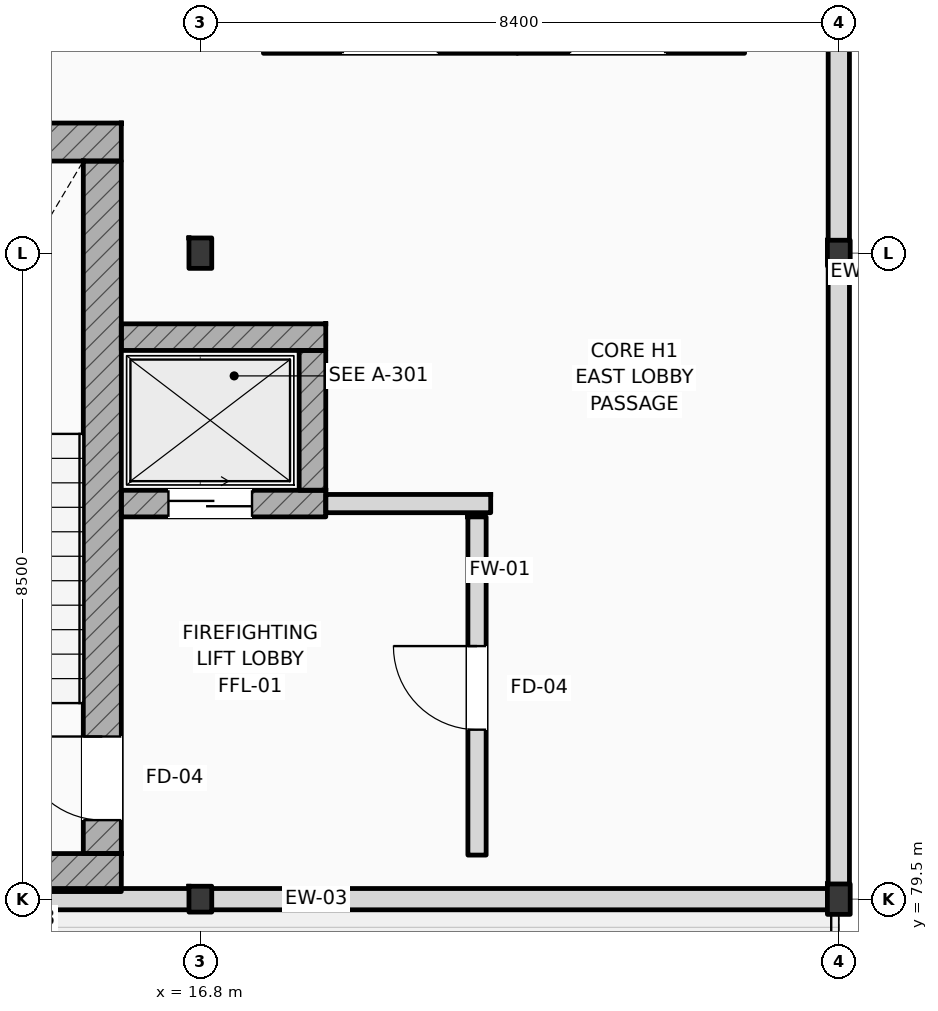
"""IFC4 building model, lengths in metres.
Left out: names, types, materials, properties, quantities, classifications, styles, units other than length and angle.
Written with IfcOpenShell. Run it as: python <this file> out.ifc"""

import sys

from ifc_helpers import new_model, si_unit, direction, frame, frame_2d, origin, origin_2d, place, context, subcontext, project, spatial, rectangle, i_section, extrude, element, fill, save


model = new_model("IFC4")
c1 = context("Model", 3, precision=1e-05, world=origin(), true_north=direction((0.0, 1.0)))
c2 = subcontext(c1, "Body", "Model", "MODEL_VIEW")
j1 = project(units=[si_unit("LENGTHUNIT", "METRE"), si_unit("PLANEANGLEUNIT", "RADIAN")], contexts=[c1])
p1 = place(None, origin())
s1 = spatial("IfcSite", under=j1, at=p1, CompositionType="ELEMENT")
p2 = place(p1, origin())
s2 = spatial("IfcBuilding", under=s1, at=p2, CompositionType="ELEMENT")
p3 = place(p2, frame((0.0, 0.0, 42.6)))
s3 = spatial("IfcBuildingStorey", under=s2, at=p3, CompositionType="ELEMENT", Elevation=42.6)
p4 = place(p3, frame((16.8, 79.5, 0.0), z_axis=(0.0, 0.0, 1.0), x_axis=(1.0, 0.0, 0.0)))
e1 = element("IfcColumn", 1, at=p4, inside=s3, PredefinedType="COLUMN", context=c2, shape_type="SweptSolid", body=[
    extrude(i_section(OverallWidth=0.3, OverallDepth=0.34, WebThickness=0.012, FlangeThickness=0.021, FilletRadius=0.027, at=origin_2d()), origin(), (0.0, 0.0, 1.0), 4.2),
])
for number, where, z_axis, x_axis in (
    (2, (16.8, 88.0, 0.0), (0.0, 0.0, 1.0), (1.0, 0.0, 0.0)),
    (3, (25.2, 79.5, 0.0), (0.0, 0.0, 1.0), (1.0, 0.0, 0.0)),
):
    element("IfcColumn", number, at=place(p3, frame(where, z_axis=z_axis, x_axis=x_axis)), inside=s3, PredefinedType="COLUMN", context=c2, shape_type="SweptSolid", body=[
        extrude(i_section(OverallWidth=0.3, OverallDepth=0.4, WebThickness=0.013, FlangeThickness=0.024, FilletRadius=0.027, at=origin_2d()), origin(), (0.0, 0.0, 1.0), 4.2),
    ])
p5 = place(p3, frame((25.2, 88.0, 0.0), z_axis=(0.0, 0.0, 1.0), x_axis=(1.0, 0.0, 0.0)))
e4 = element("IfcColumn", 4, at=p5, inside=s3, PredefinedType="COLUMN", context=c2, shape_type="SweptSolid", body=[
    extrude(i_section(OverallWidth=0.3, OverallDepth=0.34, WebThickness=0.012, FlangeThickness=0.021, FilletRadius=0.027, at=origin_2d()), origin(), (0.0, 0.0, 1.0), 4.2),
])
for number, where, z_axis, x_axis in (
    (5, (10.6, 89.462, 0.0), (0.0, 0.0, 1.0), (1.0, 0.0, 0.0)),
    (6, (10.6, 79.85, 0.0), (0.0, 0.0, 1.0), (1.0, 0.0, 0.0)),
):
    element("IfcWall", number, at=place(p3, frame(where, z_axis=z_axis, x_axis=x_axis)), inside=s3, PredefinedType="SHEAR", context=c2, shape_type="SweptSolid", body=[
        extrude(rectangle(XDim=5.16, YDim=0.5, at=frame_2d((2.58, 0.0))), origin(), (0.0, 0.0, 1.0), 4.2),
    ])
p6 = place(p3, frame((15.51, 80.1, 0.0), z_axis=(0.0, 0.0, 1.0), x_axis=(0.0, 1.0, 0.0)))
e7 = element("IfcWall", 7, at=p6, inside=s3, PredefinedType="SHEAR", context=c2, shape_type="SweptSolid", body=[
    extrude(rectangle(XDim=9.112, YDim=0.5, at=frame_2d((4.556, 0.0))), origin(), (0.0, 0.0, 1.0), 4.2),
])
p7 = place(p6, frame((0.44, 0.0, 0.0)))
e8 = element("IfcOpeningElement", 8, at=p7, cuts=e7, PredefinedType="OPENING", context=c2, shape_type="SweptSolid", body=[
    extrude(rectangle(XDim=1.1, YDim=2.2, at=frame_2d((0.55, 1.1))), frame((0.0, 0.26, 0.0), z_axis=(0.0, -1.0, 0.0), x_axis=(1.0, 0.0, 0.0)), (0.0, 0.0, 1.0), 0.52),
])
p8 = place(p3, frame((0.0, 79.5, 0.0), z_axis=(0.0, 0.0, 1.0), x_axis=(1.0, 0.0, 0.0)))
e9 = element("IfcWall", 9, at=p8, inside=s3, PredefinedType="STANDARD", context=c2, shape_type="SweptSolid", body=[
    extrude(rectangle(XDim=25.2, YDim=0.28, at=frame_2d((12.6, 0.0))), origin(), (0.0, 0.0, 1.0), 3.38),
])
p9 = place(p8, frame((8.75, 0.0, 0.0)))
e10 = element("IfcOpeningElement", 10, at=p9, cuts=e9, PredefinedType="OPENING", context=c2, shape_type="SweptSolid", body=[
    extrude(rectangle(XDim=1.8, YDim=2.4, at=frame_2d((0.9, 1.2))), frame((0.0, 0.15, 0.0), z_axis=(0.0, -1.0, 0.0), x_axis=(1.0, 0.0, 0.0)), (0.0, 0.0, 1.0), 0.3),
])
p10 = place(p3, frame((25.2, 79.5, 0.0), z_axis=(0.0, 0.0, 1.0), x_axis=(0.0, 1.0, 0.0)))
e11 = element("IfcWall", 11, at=p10, inside=s3, PredefinedType="STANDARD", context=c2, shape_type="SweptSolid", body=[
    extrude(rectangle(XDim=16.5, YDim=0.28, at=frame_2d((8.25, 0.0))), origin(), (0.0, 0.0, 1.0), 3.57),
])
p11 = place(p3, frame((15.76, 86.895, 0.0), z_axis=(0.0, 0.0, 1.0), x_axis=(1.0, 0.0, 0.0)))
e12 = element("IfcWall", 12, at=p11, inside=s3, PredefinedType="SHEAR", context=c2, shape_type="SweptSolid", body=[
    extrude(rectangle(XDim=2.69, YDim=0.35, at=frame_2d((1.345, 0.0))), origin(), (0.0, 0.0, 1.0), 3.94),
])
p12 = place(p3, frame((15.76, 84.705, 0.0), z_axis=(0.0, 0.0, 1.0), x_axis=(1.0, 0.0, 0.0)))
e13 = element("IfcWall", 13, at=p12, inside=s3, PredefinedType="SHEAR", context=c2, shape_type="SweptSolid", body=[
    extrude(rectangle(XDim=2.69, YDim=0.35, at=frame_2d((1.345, 0.0))), origin(), (0.0, 0.0, 1.0), 3.94),
])
p13 = place(p12, frame((0.62, 0.0, 0.0)))
e14 = element("IfcOpeningElement", 14, at=p13, cuts=e13, PredefinedType="OPENING", context=c2, shape_type="SweptSolid", body=[
    extrude(rectangle(XDim=1.1, YDim=2.2, at=frame_2d((0.55, 1.1))), frame((0.0, 0.185, 0.0), z_axis=(0.0, -1.0, 0.0), x_axis=(1.0, 0.0, 0.0)), (0.0, 0.0, 1.0), 0.37),
])
p14 = place(p3, frame((18.275, 84.88, 0.0), z_axis=(0.0, 0.0, 1.0), x_axis=(0.0, 1.0, 0.0)))
e15 = element("IfcWall", 15, at=p14, inside=s3, PredefinedType="SHEAR", context=c2, shape_type="SweptSolid", body=[
    extrude(rectangle(XDim=1.84, YDim=0.35, at=frame_2d((0.92, 0.0))), origin(), (0.0, 0.0, 1.0), 3.94),
])
p15 = place(p3, frame((17.63, 90.805, 0.0), z_axis=(0.0, 0.0, 1.0), x_axis=(1.0, 0.0, 0.0)))
e16 = element("IfcWall", 16, at=p15, inside=s3, PredefinedType="SHEAR", context=c2, shape_type="SweptSolid", body=[
    extrude(rectangle(XDim=3.34, YDim=0.35, at=frame_2d((1.67, 0.0))), origin(), (0.0, 0.0, 1.0), 3.94),
])
p16 = place(p15, frame((1.045, 0.0, 0.0)))
e17 = element("IfcOpeningElement", 17, at=p16, cuts=e16, PredefinedType="OPENING", context=c2, shape_type="SweptSolid", body=[
    extrude(rectangle(XDim=1.25, YDim=2.25, at=frame_2d((0.625, 1.125))), frame((0.0, 0.185, 0.0), z_axis=(0.0, -1.0, 0.0), x_axis=(1.0, 0.0, 0.0)), (0.0, 0.0, 1.0), 0.37),
])
p17 = place(p3, frame((20.97, 90.805, 0.0), z_axis=(0.0, 0.0, 1.0), x_axis=(1.0, 0.0, 0.0)))
e18 = element("IfcWall", 18, at=p17, inside=s3, PredefinedType="SHEAR", context=c2, shape_type="SweptSolid", body=[
    extrude(rectangle(XDim=2.99, YDim=0.35, at=frame_2d((1.495, 0.0))), origin(), (0.0, 0.0, 1.0), 3.94),
])
p18 = place(p17, frame((0.695, 0.0, 0.0)))
e19 = element("IfcOpeningElement", 19, at=p18, cuts=e18, PredefinedType="OPENING", context=c2, shape_type="SweptSolid", body=[
    extrude(rectangle(XDim=1.25, YDim=2.25, at=frame_2d((0.625, 1.125))), frame((0.0, 0.185, 0.0), z_axis=(0.0, -1.0, 0.0), x_axis=(1.0, 0.0, 0.0)), (0.0, 0.0, 1.0), 0.37),
])
p19 = place(p3, frame((18.45, 84.705, 0.0), z_axis=(0.0, 0.0, 1.0), x_axis=(1.0, 0.0, 0.0)))
e20 = element("IfcWall", 20, at=p19, inside=s3, PredefinedType="STANDARD", context=c2, shape_type="SweptSolid", body=[
    extrude(rectangle(XDim=2.17, YDim=0.24, at=frame_2d((1.085, 0.0))), origin(), (0.0, 0.0, 1.0), 3.94),
])
p20 = place(p3, frame((20.44, 80.08, 0.0), z_axis=(0.0, 0.0, 1.0), x_axis=(0.0, 1.0, 0.0)))
e21 = element("IfcWall", 21, at=p20, inside=s3, PredefinedType="STANDARD", context=c2, shape_type="SweptSolid", body=[
    extrude(rectangle(XDim=4.45, YDim=0.24, at=frame_2d((2.225, 0.0))), origin(), (0.0, 0.0, 1.0), 3.94),
])
p21 = place(p20, frame((1.65, 0.0, 0.0)))
e22 = element("IfcOpeningElement", 22, at=p21, cuts=e21, PredefinedType="OPENING", context=c2, shape_type="SweptSolid", body=[
    extrude(rectangle(XDim=1.1, YDim=2.2, at=frame_2d((0.55, 1.1))), frame((0.0, 0.13, 0.0), z_axis=(0.0, -1.0, 0.0), x_axis=(1.0, 0.0, 0.0)), (0.0, 0.0, 1.0), 0.26),
])
p22 = place(p7, origin())
e23 = element("IfcDoor", 23, at=p22, inside=s3, OperationType="SINGLE_SWING_RIGHT", PredefinedType="DOOR", context=c2, shape_type="SweptSolid", body=[
    extrude(rectangle(XDim=1.1, YDim=2.2, at=frame_2d((0.55, 1.1))), frame((0.0, 0.025, 0.0), z_axis=(0.0, -1.0, 0.0), x_axis=(1.0, 0.0, 0.0)), (0.0, 0.0, 1.0), 0.05),
])
fill(e8, e23)
p23 = place(p13, origin())
e24 = element("IfcDoor", 24, at=p23, inside=s3, OperationType="SLIDING_TO_LEFT", PredefinedType="DOOR", context=c2, shape_type="SweptSolid", body=[
    extrude(rectangle(XDim=1.1, YDim=2.2, at=frame_2d((0.55, 1.1))), frame((0.0, 0.025, 0.0), z_axis=(0.0, -1.0, 0.0), x_axis=(1.0, 0.0, 0.0)), (0.0, 0.0, 1.0), 0.05),
])
fill(e14, e24)
p24 = place(p21, origin())
e25 = element("IfcDoor", 25, at=p24, inside=s3, OperationType="SINGLE_SWING_RIGHT", PredefinedType="DOOR", context=c2, shape_type="SweptSolid", body=[
    extrude(rectangle(XDim=1.1, YDim=2.2, at=frame_2d((0.55, 1.1))), frame((0.0, 0.025, 0.0), z_axis=(0.0, -1.0, 0.0), x_axis=(1.0, 0.0, 0.0)), (0.0, 0.0, 1.0), 0.05),
])
fill(e22, e25)
save(model, sys.argv[1])
